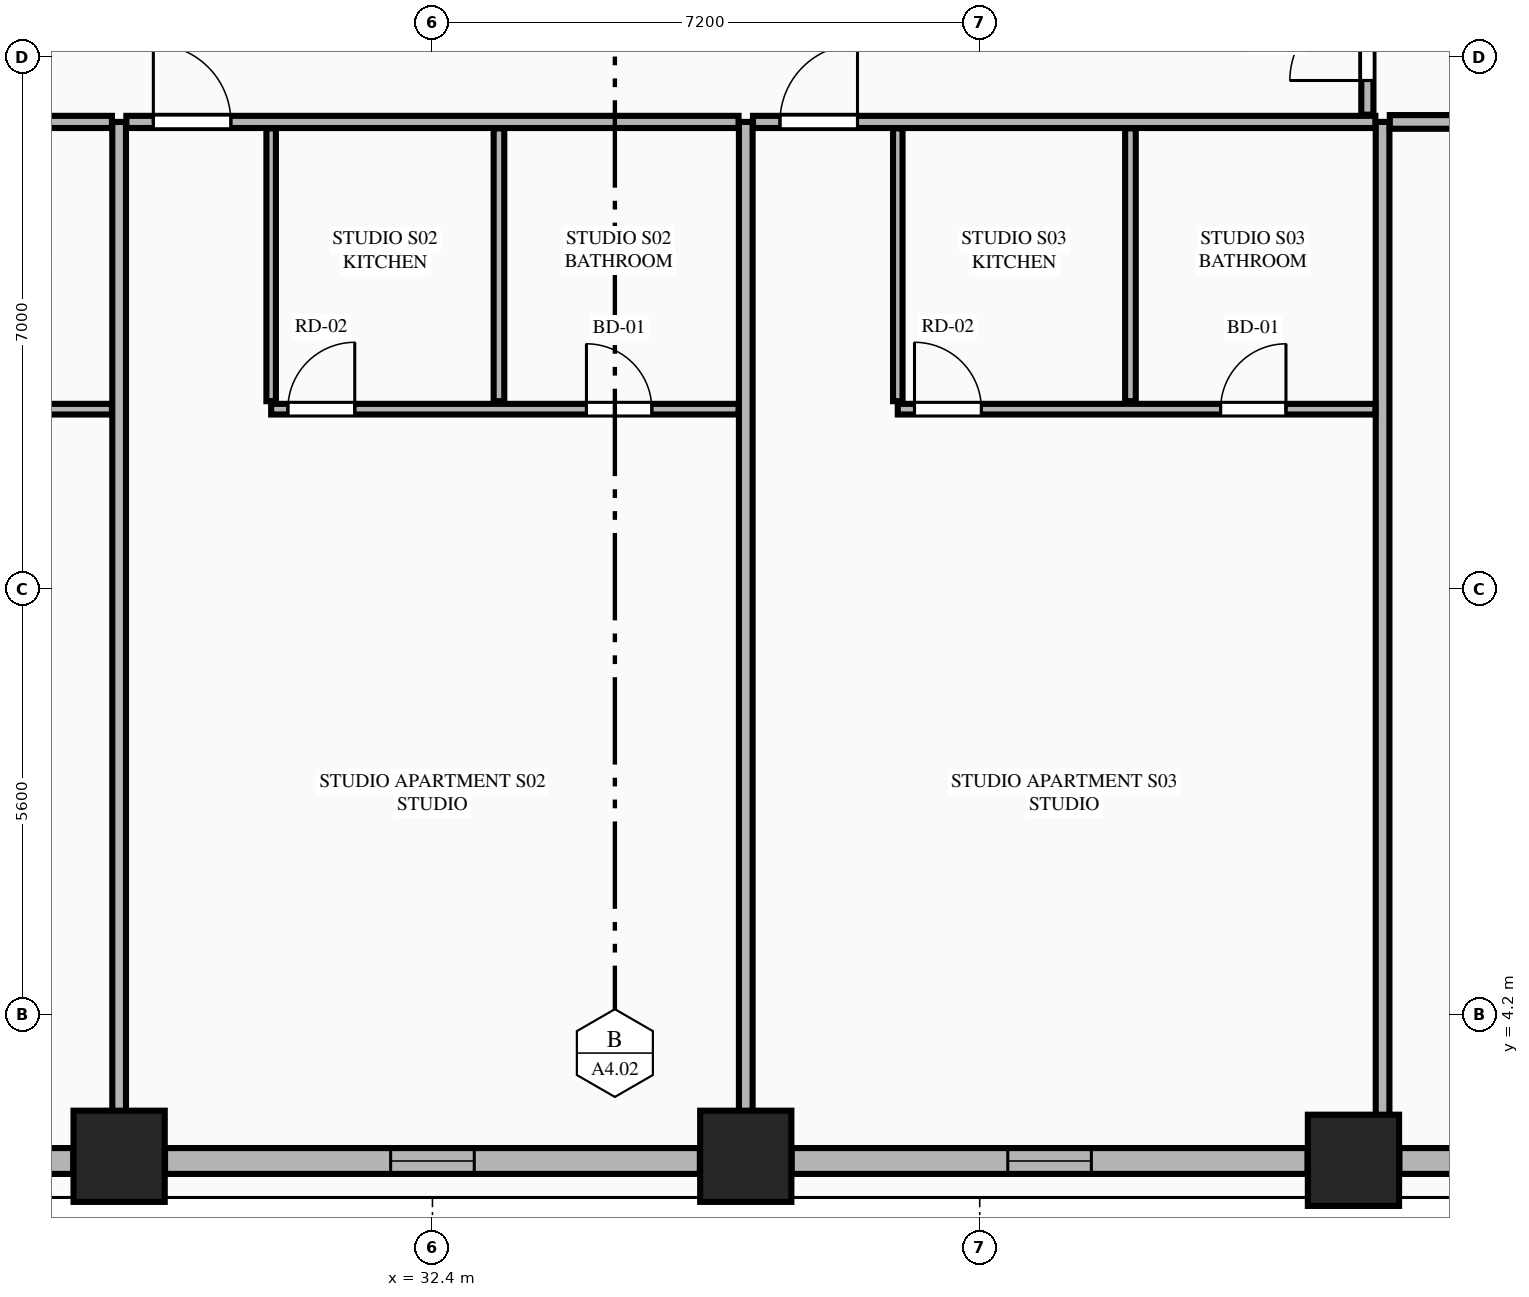
"""IFC4 building model, lengths in metres.
Left out: names, types, materials, properties, quantities, classifications, styles, units other than length and angle.
Written with IfcOpenShell. Run it as: python <this file> out.ifc"""

import sys

from ifc_helpers import new_model, si_unit, direction, frame, frame_2d, origin, origin_2d, place, context, subcontext, project, spatial, rectangle, extrude, element, fill, save


model = new_model("IFC4")
c1 = context("Model", 3, precision=1e-05, world=origin(), true_north=direction((0.0, 1.0)))
c2 = subcontext(c1, "Body", "Model", "MODEL_VIEW")
j1 = project(units=[si_unit("LENGTHUNIT", "METRE"), si_unit("PLANEANGLEUNIT", "RADIAN")], contexts=[c1])
p1 = place(None, origin())
s1 = spatial("IfcSite", under=j1, at=p1, CompositionType="ELEMENT")
p2 = place(p1, origin())
s2 = spatial("IfcBuilding", under=s1, at=p2, CompositionType="ELEMENT")
p3 = place(p2, frame((0.0, 0.0, 60.4)))
s3 = spatial("IfcBuildingStorey", under=s2, at=p3, CompositionType="ELEMENT", Elevation=60.4)
for number, where, z_axis, x_axis in (
    (1, (28.278, 2.342, 0.0), (0.0, 0.0, 1.0), (1.0, 0.0, 0.0)),
    (2, (36.522, 2.342, 0.0), (0.0, 0.0, 1.0), (1.0, 0.0, 0.0)),
    (3, (44.517, 2.289, 0.0), (0.0, 0.0, 1.0), (1.0, 0.0, 0.0)),
):
    element("IfcColumn", number, at=place(p3, frame(where, z_axis=z_axis, x_axis=x_axis)), inside=s3, PredefinedType="COLUMN", context=c2, shape_type="SweptSolid", body=[
        extrude(rectangle(XDim=1.2, YDim=1.2, at=origin_2d()), origin(), (0.0, 0.0, 1.0), 3.55),
    ])
p4 = place(p3, frame((20.887, 2.28, 0.0), z_axis=(0.0, 0.0, 1.0), x_axis=(1.0, 0.0, 0.0)))
e4 = element("IfcWall", 4, at=p4, inside=s3, PredefinedType="STANDARD", context=c2, shape_type="SweptSolid", body=[
    extrude(rectangle(XDim=6.787, YDim=0.34, at=frame_2d((3.394, 0.0))), origin(), (0.0, 0.0, 1.0), 2.787),
])
p5 = place(p4, frame((2.843, 0.0, 0.75)))
e5 = element("IfcOpeningElement", 5, at=p5, cuts=e4, PredefinedType="OPENING", context=c2, shape_type="SweptSolid", body=[
    extrude(rectangle(XDim=1.1, YDim=1.887, at=frame_2d((0.55, 0.943))), frame((0.0, 0.18, 0.0), z_axis=(0.0, -1.0, 0.0), x_axis=(1.0, 0.0, 0.0)), (0.0, 0.0, 1.0), 0.36),
])
p6 = place(p3, frame((28.882, 2.28, 0.0), z_axis=(0.0, 0.0, 1.0), x_axis=(1.0, 0.0, 0.0)))
e6 = element("IfcWall", 6, at=p6, inside=s3, PredefinedType="STANDARD", context=c2, shape_type="SweptSolid", body=[
    extrude(rectangle(XDim=7.036, YDim=0.34, at=frame_2d((3.518, 0.0))), origin(), (0.0, 0.0, 1.0), 2.787),
])
p7 = place(p6, frame((2.968, 0.0, 0.75)))
e7 = element("IfcOpeningElement", 7, at=p7, cuts=e6, PredefinedType="OPENING", context=c2, shape_type="SweptSolid", body=[
    extrude(rectangle(XDim=1.1, YDim=1.887, at=frame_2d((0.55, 0.943))), frame((0.0, 0.18, 0.0), z_axis=(0.0, -1.0, 0.0), x_axis=(1.0, 0.0, 0.0)), (0.0, 0.0, 1.0), 0.36),
])
p8 = place(p3, frame((37.126, 2.28, 0.0), z_axis=(0.0, 0.0, 1.0), x_axis=(1.0, 0.0, 0.0)))
e8 = element("IfcWall", 8, at=p8, inside=s3, PredefinedType="STANDARD", context=c2, shape_type="SweptSolid", body=[
    extrude(rectangle(XDim=6.787, YDim=0.34, at=frame_2d((3.394, 0.0))), origin(), (0.0, 0.0, 1.0), 2.787),
])
p9 = place(p8, frame((2.843, 0.0, 0.75)))
e9 = element("IfcOpeningElement", 9, at=p9, cuts=e8, PredefinedType="OPENING", context=c2, shape_type="SweptSolid", body=[
    extrude(rectangle(XDim=1.1, YDim=1.887, at=frame_2d((0.55, 0.943))), frame((0.0, 0.18, 0.0), z_axis=(0.0, -1.0, 0.0), x_axis=(1.0, 0.0, 0.0)), (0.0, 0.0, 1.0), 0.36),
])
p10 = place(p3, frame((45.121, 2.28, 0.0), z_axis=(0.0, 0.0, 1.0), x_axis=(1.0, 0.0, 0.0)))
e10 = element("IfcWall", 10, at=p10, inside=s3, PredefinedType="STANDARD", context=c2, shape_type="SweptSolid", body=[
    extrude(rectangle(XDim=1.245, YDim=0.34, at=frame_2d((0.623, 0.0))), origin(), (0.0, 0.0, 1.0), 3.33),
])
for number, where, z_axis, x_axis in (
    (11, (28.278, 2.455, 0.0), (0.0, 0.0, 1.0), (0.0, 1.0, 0.0)),
    (12, (36.522, 2.455, 0.0), (0.0, 0.0, 1.0), (0.0, 1.0, 0.0)),
):
    element("IfcWall", number, at=place(p3, frame(where, z_axis=z_axis, x_axis=x_axis)), inside=s3, PredefinedType="PARTITIONING", context=c2, shape_type="SweptSolid", body=[
        extrude(rectangle(XDim=13.495, YDim=0.18, at=frame_2d((6.748, 0.0))), origin(), (0.0, 0.0, 1.0), 2.636),
    ])
p11 = place(p3, frame((44.9, 2.455, 0.0), z_axis=(0.0, 0.0, 1.0), x_axis=(0.0, 1.0, 0.0)))
e13 = element("IfcWall", 13, at=p11, inside=s3, PredefinedType="PARTITIONING", context=c2, shape_type="SweptSolid", body=[
    extrude(rectangle(XDim=13.495, YDim=0.18, at=frame_2d((6.748, 0.0))), origin(), (0.0, 0.0, 1.0), 3.33),
])
p12 = place(p3, frame((19.995, 15.95, 0.0), z_axis=(0.0, 0.0, 1.0), x_axis=(1.0, 0.0, 0.0)))
e14 = element("IfcWall", 14, at=p12, inside=s3, PredefinedType="PARTITIONING", context=c2, shape_type="SweptSolid", body=[
    extrude(rectangle(XDim=8.188, YDim=0.16, at=frame_2d((4.094, 0.0))), origin(), (0.0, 0.0, 1.0), 3.33),
])
p13 = place(p12, frame((0.705, 0.0, 0.0)))
e15 = element("IfcOpeningElement", 15, at=p13, cuts=e14, PredefinedType="OPENING", context=c2, shape_type="SweptSolid", body=[
    extrude(rectangle(XDim=1.02, YDim=2.25, at=frame_2d((0.51, 1.125))), frame((0.0, 0.09, 0.0), z_axis=(0.0, -1.0, 0.0), x_axis=(1.0, 0.0, 0.0)), (0.0, 0.0, 1.0), 0.18),
])
p14 = place(p3, frame((22.25, 12.171, 0.0), z_axis=(0.0, 0.0, 1.0), x_axis=(1.0, 0.0, 0.0)))
e16 = element("IfcWall", 16, at=p14, inside=s3, PredefinedType="PLUMBINGWALL", context=c2, shape_type="SweptSolid", body=[
    extrude(rectangle(XDim=5.933, YDim=0.14, at=frame_2d((2.967, 0.0))), origin(), (0.0, 0.0, 1.0), 3.33),
])
p15 = place(p14, frame((3.988, 0.0, 0.0)))
e17 = element("IfcOpeningElement", 17, at=p15, cuts=e16, PredefinedType="OPENING", context=c2, shape_type="SweptSolid", body=[
    extrude(rectangle(XDim=0.86, YDim=2.1, at=frame_2d((0.43, 1.05))), frame((0.0, 0.08, 0.0), z_axis=(0.0, -1.0, 0.0), x_axis=(1.0, 0.0, 0.0)), (0.0, 0.0, 1.0), 0.16),
])
p16 = place(p14, frame((0.22, 0.0, 0.0)))
e18 = element("IfcOpeningElement", 18, at=p16, cuts=e16, PredefinedType="OPENING", context=c2, shape_type="SweptSolid", body=[
    extrude(rectangle(XDim=0.88, YDim=2.15, at=frame_2d((0.44, 1.075))), frame((0.0, 0.08, 0.0), z_axis=(0.0, -1.0, 0.0), x_axis=(1.0, 0.0, 0.0)), (0.0, 0.0, 1.0), 0.16),
])
p17 = place(p3, frame((28.373, 15.95, 0.0), z_axis=(0.0, 0.0, 1.0), x_axis=(1.0, 0.0, 0.0)))
e19 = element("IfcWall", 19, at=p17, inside=s3, PredefinedType="PARTITIONING", context=c2, shape_type="SweptSolid", body=[
    extrude(rectangle(XDim=8.054, YDim=0.16, at=frame_2d((4.027, 0.0))), origin(), (0.0, 0.0, 1.0), 3.33),
])
p18 = place(p17, frame((0.355, 0.0, 0.0)))
e20 = element("IfcOpeningElement", 20, at=p18, cuts=e19, PredefinedType="OPENING", context=c2, shape_type="SweptSolid", body=[
    extrude(rectangle(XDim=1.02, YDim=2.25, at=frame_2d((0.51, 1.125))), frame((0.0, 0.09, 0.0), z_axis=(0.0, -1.0, 0.0), x_axis=(1.0, 0.0, 0.0)), (0.0, 0.0, 1.0), 0.18),
])
p19 = place(p3, frame((30.278, 12.276, 0.0), z_axis=(0.0, 0.0, 1.0), x_axis=(0.0, 1.0, 0.0)))
e21 = element("IfcWall", 21, at=p19, inside=s3, PredefinedType="PARTITIONING", context=c2, shape_type="SweptSolid", body=[
    extrude(rectangle(XDim=3.589, YDim=0.125, at=frame_2d((1.794, 0.0))), origin(), (0.0, 0.0, 1.0), 3.33),
])
p20 = place(p3, frame((30.278, 12.171, 0.0), z_axis=(0.0, 0.0, 1.0), x_axis=(1.0, 0.0, 0.0)))
e22 = element("IfcWall", 22, at=p20, inside=s3, PredefinedType="PLUMBINGWALL", context=c2, shape_type="SweptSolid", body=[
    extrude(rectangle(XDim=6.149, YDim=0.14, at=frame_2d((3.074, 0.0))), origin(), (0.0, 0.0, 1.0), 3.33),
])
p21 = place(p20, frame((4.148, 0.0, 0.0)))
e23 = element("IfcOpeningElement", 23, at=p21, cuts=e22, PredefinedType="OPENING", context=c2, shape_type="SweptSolid", body=[
    extrude(rectangle(XDim=0.86, YDim=2.1, at=frame_2d((0.43, 1.05))), frame((0.0, 0.08, 0.0), z_axis=(0.0, -1.0, 0.0), x_axis=(1.0, 0.0, 0.0)), (0.0, 0.0, 1.0), 0.16),
])
p22 = place(p20, frame((0.22, 0.0, 0.0)))
e24 = element("IfcOpeningElement", 24, at=p22, cuts=e22, PredefinedType="OPENING", context=c2, shape_type="SweptSolid", body=[
    extrude(rectangle(XDim=0.88, YDim=2.15, at=frame_2d((0.44, 1.075))), frame((0.0, 0.08, 0.0), z_axis=(0.0, -1.0, 0.0), x_axis=(1.0, 0.0, 0.0)), (0.0, 0.0, 1.0), 0.16),
])
p23 = place(p3, frame((33.275, 12.276, 0.0), z_axis=(0.0, 0.0, 1.0), x_axis=(0.0, 1.0, 0.0)))
e25 = element("IfcWall", 25, at=p23, inside=s3, PredefinedType="PLUMBINGWALL", context=c2, shape_type="SweptSolid", body=[
    extrude(rectangle(XDim=3.589, YDim=0.14, at=frame_2d((1.794, 0.0))), origin(), (0.0, 0.0, 1.0), 3.33),
])
p24 = place(p3, frame((36.617, 15.95, 0.0), z_axis=(0.0, 0.0, 1.0), x_axis=(1.0, 0.0, 0.0)))
e26 = element("IfcWall", 26, at=p24, inside=s3, PredefinedType="PARTITIONING", context=c2, shape_type="SweptSolid", body=[
    extrude(rectangle(XDim=8.188, YDim=0.16, at=frame_2d((4.094, 0.0))), origin(), (0.0, 0.0, 1.0), 3.33),
])
p25 = place(p24, frame((0.355, 0.0, 0.0)))
e27 = element("IfcOpeningElement", 27, at=p25, cuts=e26, PredefinedType="OPENING", context=c2, shape_type="SweptSolid", body=[
    extrude(rectangle(XDim=1.02, YDim=2.25, at=frame_2d((0.51, 1.125))), frame((0.0, 0.09, 0.0), z_axis=(0.0, -1.0, 0.0), x_axis=(1.0, 0.0, 0.0)), (0.0, 0.0, 1.0), 0.18),
])
p26 = place(p3, frame((38.522, 12.276, 0.0), z_axis=(0.0, 0.0, 1.0), x_axis=(0.0, 1.0, 0.0)))
e28 = element("IfcWall", 28, at=p26, inside=s3, PredefinedType="PARTITIONING", context=c2, shape_type="SweptSolid", body=[
    extrude(rectangle(XDim=3.589, YDim=0.125, at=frame_2d((1.794, 0.0))), origin(), (0.0, 0.0, 1.0), 3.33),
])
p27 = place(p3, frame((38.522, 12.171, 0.0), z_axis=(0.0, 0.0, 1.0), x_axis=(1.0, 0.0, 0.0)))
e29 = element("IfcWall", 29, at=p27, inside=s3, PredefinedType="PLUMBINGWALL", context=c2, shape_type="SweptSolid", body=[
    extrude(rectangle(XDim=6.283, YDim=0.14, at=frame_2d((3.142, 0.0))), origin(), (0.0, 0.0, 1.0), 3.33),
])
p28 = place(p27, frame((4.247, 0.0, 0.0)))
e30 = element("IfcOpeningElement", 30, at=p28, cuts=e29, PredefinedType="OPENING", context=c2, shape_type="SweptSolid", body=[
    extrude(rectangle(XDim=0.86, YDim=2.1, at=frame_2d((0.43, 1.05))), frame((0.0, 0.08, 0.0), z_axis=(0.0, -1.0, 0.0), x_axis=(1.0, 0.0, 0.0)), (0.0, 0.0, 1.0), 0.16),
])
p29 = place(p27, frame((0.22, 0.0, 0.0)))
e31 = element("IfcOpeningElement", 31, at=p29, cuts=e29, PredefinedType="OPENING", context=c2, shape_type="SweptSolid", body=[
    extrude(rectangle(XDim=0.88, YDim=2.15, at=frame_2d((0.44, 1.075))), frame((0.0, 0.08, 0.0), z_axis=(0.0, -1.0, 0.0), x_axis=(1.0, 0.0, 0.0)), (0.0, 0.0, 1.0), 0.16),
])
p30 = place(p3, frame((41.583, 12.276, 0.0), z_axis=(0.0, 0.0, 1.0), x_axis=(0.0, 1.0, 0.0)))
e32 = element("IfcWall", 32, at=p30, inside=s3, PredefinedType="PLUMBINGWALL", context=c2, shape_type="SweptSolid", body=[
    extrude(rectangle(XDim=3.589, YDim=0.14, at=frame_2d((1.794, 0.0))), origin(), (0.0, 0.0, 1.0), 3.33),
])
p31 = place(p3, frame((44.995, 15.95, 0.0), z_axis=(0.0, 0.0, 1.0), x_axis=(1.0, 0.0, 0.0)))
e33 = element("IfcWall", 33, at=p31, inside=s3, PredefinedType="PARTITIONING", context=c2, shape_type="SweptSolid", body=[
    extrude(rectangle(XDim=9.241, YDim=0.18, at=frame_2d((4.621, 0.0))), origin(), (0.0, 0.0, 1.0), 3.33),
])
p32 = place(p3, frame((44.7, 16.045, 0.0), z_axis=(0.0, 0.0, 1.0), x_axis=(0.0, 1.0, 0.0)))
e34 = element("IfcWall", 34, at=p32, inside=s3, PredefinedType="PARTITIONING", context=c2, shape_type="SweptSolid", body=[
    extrude(rectangle(XDim=19.71, YDim=0.16, at=frame_2d((9.855, 0.0))), origin(), (0.0, 0.0, 1.0), 3.33),
])
p33 = place(p32, frame((0.45, 0.0, 0.0)))
e35 = element("IfcOpeningElement", 35, at=p33, cuts=e34, PredefinedType="OPENING", context=c2, shape_type="SweptSolid", body=[
    extrude(rectangle(XDim=1.02, YDim=2.25, at=frame_2d((0.51, 1.125))), frame((0.0, 0.09, 0.0), z_axis=(0.0, -1.0, 0.0), x_axis=(1.0, 0.0, 0.0)), (0.0, 0.0, 1.0), 0.18),
])
p34 = place(p7, origin())
e36 = element("IfcWindow", 36, at=p34, inside=s3, PartitioningType="SINGLE_PANEL", PredefinedType="WINDOW", context=c2, shape_type="SweptSolid", body=[
    extrude(rectangle(XDim=1.1, YDim=1.887, at=frame_2d((0.55, 0.943))), frame((0.0, 0.03, 0.0), z_axis=(0.0, -1.0, 0.0), x_axis=(1.0, 0.0, 0.0)), (0.0, 0.0, 1.0), 0.06),
])
fill(e7, e36)
p35 = place(p9, origin())
e37 = element("IfcWindow", 37, at=p35, inside=s3, PartitioningType="SINGLE_PANEL", PredefinedType="WINDOW", context=c2, shape_type="SweptSolid", body=[
    extrude(rectangle(XDim=1.1, YDim=1.887, at=frame_2d((0.55, 0.943))), frame((0.0, 0.03, 0.0), z_axis=(0.0, -1.0, 0.0), x_axis=(1.0, 0.0, 0.0)), (0.0, 0.0, 1.0), 0.06),
])
fill(e9, e37)
p36 = place(p21, origin())
e38 = element("IfcDoor", 38, at=p36, inside=s3, OperationType="SINGLE_SWING_LEFT", PredefinedType="DOOR", context=c2, shape_type="SweptSolid", body=[
    extrude(rectangle(XDim=0.86, YDim=2.1, at=frame_2d((0.43, 1.05))), frame((0.0, 0.025, 0.0), z_axis=(0.0, -1.0, 0.0), x_axis=(1.0, 0.0, 0.0)), (0.0, 0.0, 1.0), 0.05),
])
fill(e23, e38)
p37 = place(p18, origin())
e39 = element("IfcDoor", 39, at=p37, inside=s3, OperationType="SINGLE_SWING_LEFT", PredefinedType="DOOR", context=c2, shape_type="SweptSolid", body=[
    extrude(rectangle(XDim=1.02, YDim=2.25, at=frame_2d((0.51, 1.125))), frame((0.0, 0.025, 0.0), z_axis=(0.0, -1.0, 0.0), x_axis=(1.0, 0.0, 0.0)), (0.0, 0.0, 1.0), 0.05),
])
fill(e20, e39)
p38 = place(p22, origin())
e40 = element("IfcDoor", 40, at=p38, inside=s3, OperationType="SINGLE_SWING_RIGHT", PredefinedType="DOOR", context=c2, shape_type="SweptSolid", body=[
    extrude(rectangle(XDim=0.88, YDim=2.15, at=frame_2d((0.44, 1.075))), frame((0.0, 0.025, 0.0), z_axis=(0.0, -1.0, 0.0), x_axis=(1.0, 0.0, 0.0)), (0.0, 0.0, 1.0), 0.05),
])
fill(e24, e40)
p39 = place(p28, origin())
e41 = element("IfcDoor", 41, at=p39, inside=s3, OperationType="SINGLE_SWING_RIGHT", PredefinedType="DOOR", context=c2, shape_type="SweptSolid", body=[
    extrude(rectangle(XDim=0.86, YDim=2.1, at=frame_2d((0.43, 1.05))), frame((0.0, 0.025, 0.0), z_axis=(0.0, -1.0, 0.0), x_axis=(1.0, 0.0, 0.0)), (0.0, 0.0, 1.0), 0.05),
])
fill(e30, e41)
p40 = place(p25, origin())
e42 = element("IfcDoor", 42, at=p40, inside=s3, OperationType="SINGLE_SWING_RIGHT", PredefinedType="DOOR", context=c2, shape_type="SweptSolid", body=[
    extrude(rectangle(XDim=1.02, YDim=2.25, at=frame_2d((0.51, 1.125))), frame((0.0, 0.025, 0.0), z_axis=(0.0, -1.0, 0.0), x_axis=(1.0, 0.0, 0.0)), (0.0, 0.0, 1.0), 0.05),
])
fill(e27, e42)
p41 = place(p29, origin())
e43 = element("IfcDoor", 43, at=p41, inside=s3, OperationType="SINGLE_SWING_LEFT", PredefinedType="DOOR", context=c2, shape_type="SweptSolid", body=[
    extrude(rectangle(XDim=0.88, YDim=2.15, at=frame_2d((0.44, 1.075))), frame((0.0, 0.025, 0.0), z_axis=(0.0, -1.0, 0.0), x_axis=(1.0, 0.0, 0.0)), (0.0, 0.0, 1.0), 0.05),
])
fill(e31, e43)
p42 = place(p33, origin())
e44 = element("IfcDoor", 44, at=p42, inside=s3, OperationType="SINGLE_SWING_LEFT", PredefinedType="DOOR", context=c2, shape_type="SweptSolid", body=[
    extrude(rectangle(XDim=1.02, YDim=2.25, at=frame_2d((0.51, 1.125))), frame((0.0, 0.025, 0.0), z_axis=(0.0, -1.0, 0.0), x_axis=(1.0, 0.0, 0.0)), (0.0, 0.0, 1.0), 0.05),
])
fill(e35, e44)
save(model, sys.argv[1])
